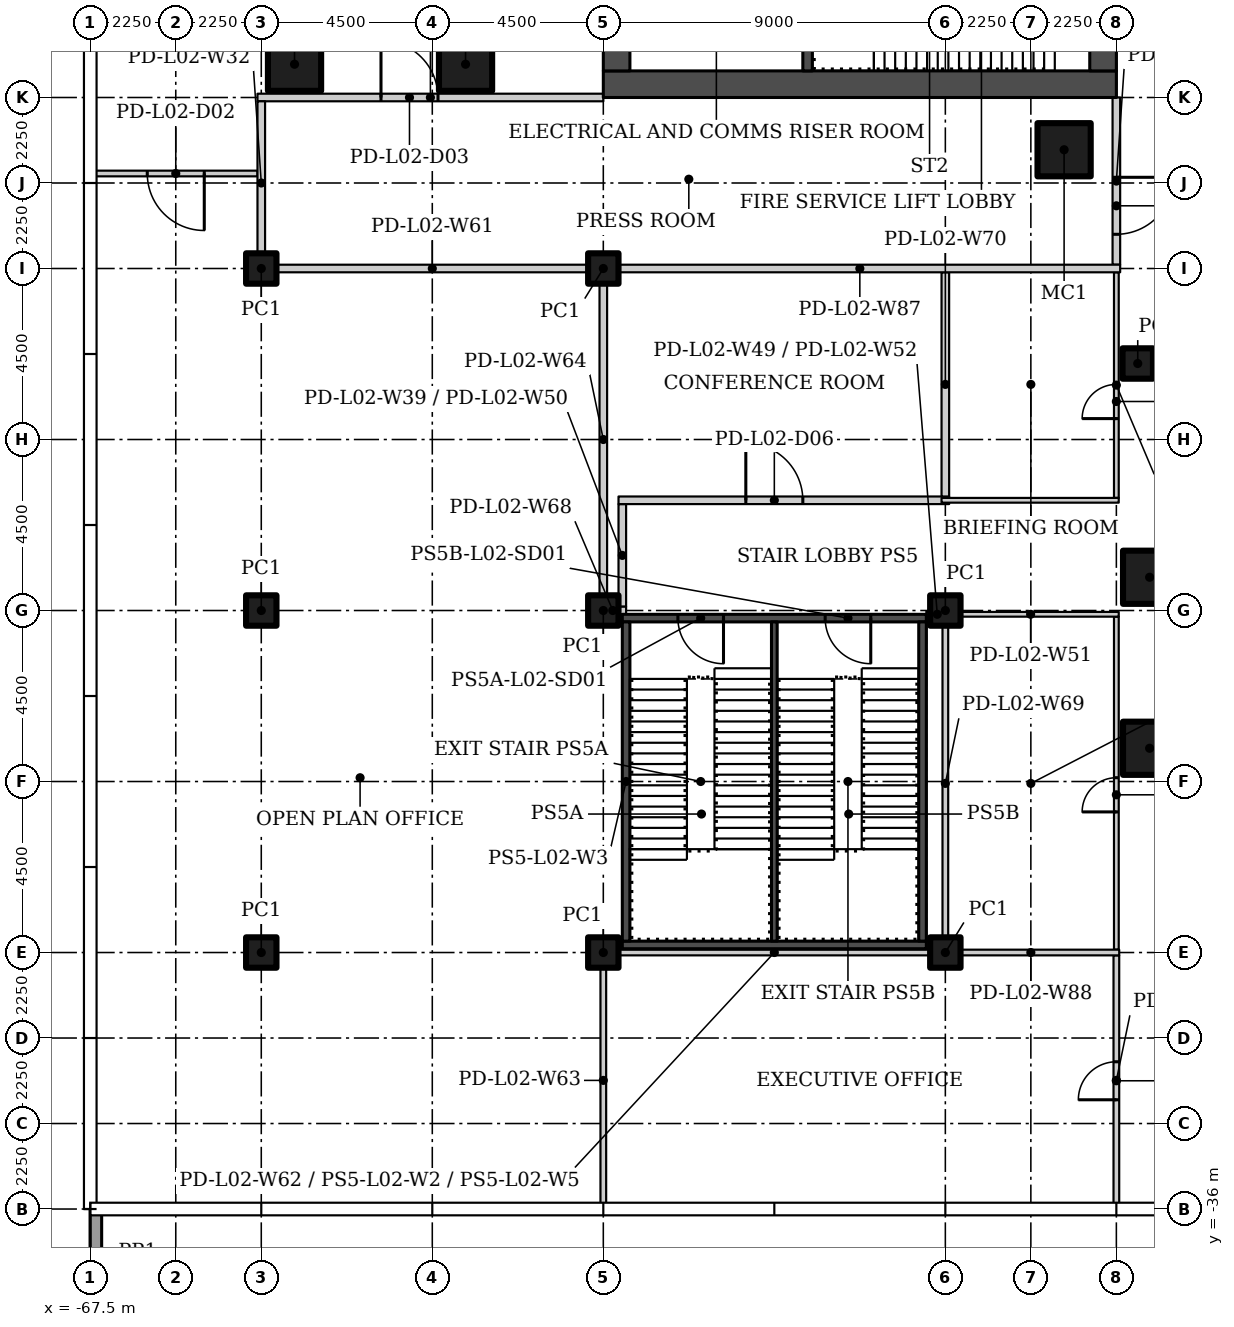
"""IFC4 building model, lengths in metres.
Left out: names, types, materials, properties, quantities, classifications, styles, units other than length and angle.
Written with IfcOpenShell. Run it as: python <this file> out.ifc"""

import sys

from ifc_helpers import new_model, si_unit, direction, frame, frame_2d, origin, origin_2d, place, context, subcontext, project, spatial, rectangle, hollow_rectangle, extrude, element, fill, save


model = new_model("IFC4")
c1 = context("Model", 3, precision=1e-05, world=origin(), true_north=direction((0.0, 1.0)))
c2 = subcontext(c1, "Body", "Model", "MODEL_VIEW")
j1 = project(units=[si_unit("LENGTHUNIT", "METRE"), si_unit("PLANEANGLEUNIT", "RADIAN")], contexts=[c1])
p1 = place(None, origin())
s1 = spatial("IfcSite", under=j1, at=p1, CompositionType="ELEMENT")
p2 = place(p1, origin())
s2 = spatial("IfcBuilding", under=s1, at=p2, CompositionType="ELEMENT")
p3 = place(p2, frame((0.0, 0.0, 12.5)))
s3 = spatial("IfcBuildingStorey", under=s2, at=p3, CompositionType="ELEMENT", Elevation=12.5)
for number, where in (
    (1, (-41.875, -8.125, 0.0)),
    (2, (-57.625, -5.875, 0.0)),
    (3, (-62.125, -5.875, 0.0)),
):
    element("IfcColumn", number, at=place(p3, frame(where)), inside=s3, PredefinedType="COLUMN", context=c2, shape_type="SweptSolid", body=[
        extrude(hollow_rectangle(XDim=1.4, YDim=1.4, WallThickness=0.06, at=origin_2d()), origin(), (0.0, 0.0, 1.0), 5.6),
    ])
p4 = place(p3, frame((-39.938, -13.75, 0.0)))
e4 = element("IfcColumn", 4, at=p4, inside=s3, PredefinedType="COLUMN", context=c2, shape_type="SweptSolid", body=[
    extrude(hollow_rectangle(XDim=0.8, YDim=0.8, WallThickness=0.03, at=origin_2d()), origin(), (0.0, 0.0, 1.0), 5.6),
])
for number, where in (
    (5, (-39.625, -19.375, 0.0)),
    (6, (-39.625, -23.875, 0.0)),
):
    element("IfcColumn", number, at=place(p3, frame(where)), inside=s3, PredefinedType="COLUMN", context=c2, shape_type="SweptSolid", body=[
        extrude(hollow_rectangle(XDim=1.4, YDim=1.4, WallThickness=0.06, at=origin_2d()), origin(), (0.0, 0.0, 1.0), 5.6),
    ])
for number, where in (
    (7, (-63.0, -29.25, 0.0)),
    (8, (-63.0, -20.25, 0.0)),
    (9, (-63.0, -11.25, 0.0)),
    (10, (-54.0, -29.25, 0.0)),
    (11, (-54.0, -20.25, 0.0)),
    (12, (-54.0, -11.25, 0.0)),
    (13, (-45.0, -29.25, 0.0)),
    (14, (-45.0, -20.25, 0.0)),
):
    element("IfcColumn", number, at=place(p3, frame(where)), inside=s3, PredefinedType="COLUMN", context=c2, shape_type="SweptSolid", body=[
        extrude(hollow_rectangle(XDim=0.8, YDim=0.8, WallThickness=0.03, at=origin_2d()), origin(), (0.0, 0.0, 1.0), 5.6),
    ])
p5 = place(p3, frame((-40.5, -6.75, 0.0), z_axis=(0.0, 0.0, 1.0), x_axis=(0.0, -1.0, 0.0)))
e15 = element("IfcWall", 15, at=p5, inside=s3, PredefinedType="PARTITIONING", context=c2, shape_type="SweptSolid", body=[
    extrude(rectangle(XDim=4.4, YDim=0.2, at=frame_2d((2.2, 0.0))), origin(), (0.0, 0.0, 1.0), 5.6),
])
p6 = place(p5, frame((2.1, 0.0, 0.0)))
e16 = element("IfcOpeningElement", 16, at=p6, cuts=e15, PredefinedType="OPENING", context=c2, shape_type="SweptSolid", body=[
    extrude(rectangle(XDim=1.5, YDim=2.1, at=frame_2d((0.75, 1.05))), frame((0.0, 0.11, 0.0), z_axis=(0.0, -1.0, 0.0), x_axis=(1.0, 0.0, 0.0)), (0.0, 0.0, 1.0), 0.22),
])
p7 = place(p3, frame((-40.5, -35.905, 0.0), z_axis=(0.0, 0.0, 1.0), x_axis=(0.0, 1.0, 0.0)))
e17 = element("IfcWall", 17, at=p7, inside=s3, PredefinedType="PARTITIONING", context=c2, shape_type="SweptSolid", body=[
    extrude(rectangle(XDim=6.58, YDim=0.15, at=frame_2d((3.29, 0.0))), origin(), (0.0, 0.0, 1.0), 5.6),
])
p8 = place(p7, frame((2.78, 0.0, 0.0)))
e18 = element("IfcOpeningElement", 18, at=p8, cuts=e17, PredefinedType="OPENING", context=c2, shape_type="SweptSolid", body=[
    extrude(rectangle(XDim=1.0, YDim=2.4, at=frame_2d((0.5, 1.2))), frame((0.0, 0.085, 0.0), z_axis=(0.0, -1.0, 0.0), x_axis=(1.0, 0.0, 0.0)), (0.0, 0.0, 1.0), 0.17),
])
p9 = place(p3, frame((-40.5, -29.175, 0.0), z_axis=(0.0, 0.0, 1.0), x_axis=(0.0, 1.0, 0.0)))
e19 = element("IfcWall", 19, at=p9, inside=s3, PredefinedType="PARTITIONING", context=c2, shape_type="SweptSolid", body=[
    extrude(rectangle(XDim=8.763, YDim=0.125, at=frame_2d((4.381, 0.0))), origin(), (0.0, 0.0, 1.0), 5.6),
])
p10 = place(p9, frame((3.625, 0.0, 0.0)))
e20 = element("IfcOpeningElement", 20, at=p10, cuts=e19, PredefinedType="OPENING", context=c2, shape_type="SweptSolid", body=[
    extrude(rectangle(XDim=0.9, YDim=2.1, at=frame_2d((0.45, 1.05))), frame((0.0, 0.073, 0.0), z_axis=(0.0, -1.0, 0.0), x_axis=(1.0, 0.0, 0.0)), (0.0, 0.0, 1.0), 0.145),
])
p11 = place(p3, frame((-40.5, -17.287, 0.0), z_axis=(0.0, 0.0, 1.0), x_axis=(0.0, 1.0, 0.0)))
e21 = element("IfcWall", 21, at=p11, inside=s3, PredefinedType="PARTITIONING", context=c2, shape_type="SweptSolid", body=[
    extrude(rectangle(XDim=5.937, YDim=0.125, at=frame_2d((2.969, 0.0))), origin(), (0.0, 0.0, 1.0), 5.6),
])
p12 = place(p11, frame((2.087, 0.0, 0.0)))
e22 = element("IfcOpeningElement", 22, at=p12, cuts=e21, PredefinedType="OPENING", context=c2, shape_type="SweptSolid", body=[
    extrude(rectangle(XDim=0.9, YDim=2.1, at=frame_2d((0.45, 1.05))), frame((0.0, 0.073, 0.0), z_axis=(0.0, -1.0, 0.0), x_axis=(1.0, 0.0, 0.0)), (0.0, 0.0, 1.0), 0.145),
])
p13 = place(p3, frame((-63.1, -8.75, 0.0), z_axis=(0.0, 0.0, 1.0), x_axis=(-1.0, 0.0, 0.0)))
e23 = element("IfcWall", 23, at=p13, inside=s3, PredefinedType="PARTITIONING", context=c2, shape_type="SweptSolid", body=[
    extrude(rectangle(XDim=4.305, YDim=0.15, at=frame_2d((2.152, 0.0))), origin(), (0.0, 0.0, 1.0), 5.6),
])
p14 = place(p13, frame((1.4, 0.0, 0.0)))
e24 = element("IfcOpeningElement", 24, at=p14, cuts=e23, PredefinedType="OPENING", context=c2, shape_type="SweptSolid", body=[
    extrude(rectangle(XDim=1.5, YDim=2.1, at=frame_2d((0.75, 1.05))), frame((0.0, 0.085, 0.0), z_axis=(0.0, -1.0, 0.0), x_axis=(1.0, 0.0, 0.0)), (0.0, 0.0, 1.0), 0.17),
])
p15 = place(p3, frame((-63.1, -6.75, 0.0)))
e25 = element("IfcWall", 25, at=p15, inside=s3, PredefinedType="PARTITIONING", context=c2, shape_type="SweptSolid", body=[
    extrude(rectangle(XDim=9.1, YDim=0.2, at=frame_2d((4.55, 0.0))), origin(), (0.0, 0.0, 1.0), 5.6),
])
p16 = place(p15, frame((3.25, 0.0, 0.0)))
e26 = element("IfcOpeningElement", 26, at=p16, cuts=e25, PredefinedType="OPENING", context=c2, shape_type="SweptSolid", body=[
    extrude(rectangle(XDim=1.5, YDim=2.1, at=frame_2d((0.75, 1.05))), frame((0.0, 0.11, 0.0), z_axis=(0.0, -1.0, 0.0), x_axis=(1.0, 0.0, 0.0)), (0.0, 0.0, 1.0), 0.22),
])
p17 = place(p3, frame((-63.0, -11.15, 0.0), z_axis=(0.0, 0.0, 1.0), x_axis=(0.0, 1.0, 0.0)))
e27 = element("IfcWall", 27, at=p17, inside=s3, PredefinedType="PARTITIONING", context=c2, shape_type="SweptSolid", body=[
    extrude(rectangle(XDim=4.3, YDim=0.2, at=frame_2d((2.15, 0.0))), origin(), (0.0, 0.0, 1.0), 5.6),
])
p18 = place(p3, frame((-53.5, -20.15, 0.0), z_axis=(0.0, 0.0, 1.0), x_axis=(0.0, 1.0, 0.0)))
e28 = element("IfcWall", 28, at=p18, inside=s3, PredefinedType="PARTITIONING", context=c2, shape_type="SweptSolid", body=[
    extrude(rectangle(XDim=2.7, YDim=0.2, at=frame_2d((1.35, 0.0))), origin(), (0.0, 0.0, 1.0), 5.6),
])
p19 = place(p3, frame((-44.925, -20.35, 0.0), z_axis=(0.0, 0.0, 1.0), x_axis=(-1.0, 0.0, 0.0)))
e29 = element("IfcWall", 29, at=p19, inside=s3, PredefinedType="PARTITIONING", context=c2, shape_type="SweptSolid", body=[
    extrude(rectangle(XDim=0.575, YDim=0.15, at=frame_2d((0.288, 0.0))), origin(), (0.0, 0.0, 1.0), 5.6),
])
p20 = place(p3, frame((-53.6, -17.35, 0.0)))
e30 = element("IfcWall", 30, at=p20, inside=s3, PredefinedType="PARTITIONING", context=c2, shape_type="SweptSolid", body=[
    extrude(rectangle(XDim=8.7, YDim=0.2, at=frame_2d((4.35, 0.0))), origin(), (0.0, 0.0, 1.0), 5.6),
])
p21 = place(p20, frame((3.35, 0.0, 0.0)))
e31 = element("IfcOpeningElement", 31, at=p21, cuts=e30, PredefinedType="OPENING", context=c2, shape_type="SweptSolid", body=[
    extrude(rectangle(XDim=1.5, YDim=2.1, at=frame_2d((0.75, 1.05))), frame((0.0, 0.11, 0.0), z_axis=(0.0, -1.0, 0.0), x_axis=(1.0, 0.0, 0.0)), (0.0, 0.0, 1.0), 0.22),
])
p22 = place(p3, frame((-40.438, -20.35, 0.0), z_axis=(0.0, 0.0, 1.0), x_axis=(-1.0, 0.0, 0.0)))
e32 = element("IfcWall", 32, at=p22, inside=s3, PredefinedType="PARTITIONING", context=c2, shape_type="SweptSolid", body=[
    extrude(rectangle(XDim=4.637, YDim=0.125, at=frame_2d((2.319, 0.0))), origin(), (0.0, 0.0, 1.0), 5.6),
])
p23 = place(p3, frame((-45.1, -17.35, 0.0)))
e33 = element("IfcWall", 33, at=p23, inside=s3, PredefinedType="PARTITIONING", context=c2, shape_type="SweptSolid", body=[
    extrude(rectangle(XDim=4.663, YDim=0.125, at=frame_2d((2.331, 0.0))), origin(), (0.0, 0.0, 1.0), 5.6),
])
p24 = place(p3, frame((-53.9, -11.25, 0.0), z_axis=(0.0, 0.0, 1.0), x_axis=(-1.0, 0.0, 0.0)))
e34 = element("IfcWall", 34, at=p24, inside=s3, PredefinedType="PARTITIONING", context=c2, shape_type="SweptSolid", body=[
    extrude(rectangle(XDim=9.2, YDim=0.2, at=frame_2d((4.6, 0.0))), origin(), (0.0, 0.0, 1.0), 5.6),
])
p25 = place(p3, frame((-54.075, -29.25, 0.0)))
e35 = element("IfcWall", 35, at=p25, inside=s3, PredefinedType="PARTITIONING", context=c2, shape_type="SweptSolid", body=[
    extrude(rectangle(XDim=9.15, YDim=0.15, at=frame_2d((4.575, 0.0))), origin(), (0.0, 0.0, 1.0), 5.6),
])
p26 = place(p3, frame((-54.0, -35.905, 0.0), z_axis=(0.0, 0.0, 1.0), x_axis=(0.0, 1.0, 0.0)))
e36 = element("IfcWall", 36, at=p26, inside=s3, PredefinedType="PARTITIONING", context=c2, shape_type="SweptSolid", body=[
    extrude(rectangle(XDim=6.58, YDim=0.15, at=frame_2d((3.29, 0.0))), origin(), (0.0, 0.0, 1.0), 5.6),
])
p27 = place(p3, frame((-54.0, -20.15, 0.0), z_axis=(0.0, 0.0, 1.0), x_axis=(0.0, 1.0, 0.0)))
e37 = element("IfcWall", 37, at=p27, inside=s3, PredefinedType="PARTITIONING", context=c2, shape_type="SweptSolid", body=[
    extrude(rectangle(XDim=8.8, YDim=0.2, at=frame_2d((4.4, 0.0))), origin(), (0.0, 0.0, 1.0), 5.6),
])
p28 = place(p3, frame((-53.4, -20.25, 0.0), z_axis=(0.0, 0.0, 1.0), x_axis=(-1.0, 0.0, 0.0)))
e38 = element("IfcWall", 38, at=p28, inside=s3, PredefinedType="PARTITIONING", context=c2, shape_type="SweptSolid", body=[
    extrude(rectangle(XDim=0.7, YDim=0.2, at=frame_2d((0.35, 0.0))), origin(), (0.0, 0.0, 1.0), 5.6),
])
p29 = place(p3, frame((-45.0, -29.175, 0.0), z_axis=(0.0, 0.0, 1.0), x_axis=(0.0, 1.0, 0.0)))
e39 = element("IfcWall", 39, at=p29, inside=s3, PredefinedType="PARTITIONING", context=c2, shape_type="SweptSolid", body=[
    extrude(rectangle(XDim=8.75, YDim=0.15, at=frame_2d((4.375, 0.0))), origin(), (0.0, 0.0, 1.0), 5.6),
])
p30 = place(p3, frame((-45.0, -17.25, 0.0), z_axis=(0.0, 0.0, 1.0), x_axis=(0.0, 1.0, 0.0)))
e40 = element("IfcWall", 40, at=p30, inside=s3, PredefinedType="PARTITIONING", context=c2, shape_type="SweptSolid", body=[
    extrude(rectangle(XDim=5.899, YDim=0.2, at=frame_2d((2.95, 0.0))), origin(), (0.0, 0.0, 1.0), 5.6),
])
p31 = place(p3, frame((-54.1, -11.25, 0.0)))
e41 = element("IfcWall", 41, at=p31, inside=s3, PredefinedType="PARTITIONING", context=c2, shape_type="SweptSolid", body=[
    extrude(rectangle(XDim=13.7, YDim=0.2, at=frame_2d((6.85, 0.0))), origin(), (0.0, 0.0, 1.0), 5.6),
])
p32 = place(p3, frame((-40.425, -29.25, 0.0), z_axis=(0.0, 0.0, 1.0), x_axis=(-1.0, 0.0, 0.0)))
e42 = element("IfcWall", 42, at=p32, inside=s3, PredefinedType="PARTITIONING", context=c2, shape_type="SweptSolid", body=[
    extrude(rectangle(XDim=4.65, YDim=0.15, at=frame_2d((2.325, 0.0))), origin(), (0.0, 0.0, 1.0), 5.6),
])
p33 = place(p3, frame((-67.35, -36.0, 0.0), z_axis=(0.0, 0.0, 1.0), x_axis=(0.0, -1.0, 0.0)))
e43 = element("IfcWall", 43, at=p33, inside=s3, PredefinedType="PARAPET", context=c2, shape_type="SweptSolid", body=[
    extrude(rectangle(XDim=2.25, YDim=0.3, at=frame_2d((1.125, 0.0))), origin(), (0.0, 0.0, 1.0), 1.1),
])
p34 = place(p3, frame((-40.5, -6.4, 0.0), z_axis=(0.0, 0.0, 1.0), x_axis=(-1.0, 0.0, 0.0)))
e44 = element("IfcWall", 44, at=p34, inside=s3, PredefinedType="SHEAR", context=c2, shape_type="SweptSolid", body=[
    extrude(rectangle(XDim=13.5, YDim=0.7, at=frame_2d((6.75, 0.0))), origin(), (0.0, 0.0, 1.0), 5.6),
])
p35 = place(p3, frame((-40.85, -6.05, 0.0), z_axis=(0.0, 0.0, 1.0), x_axis=(0.0, 1.0, 0.0)))
e45 = element("IfcWall", 45, at=p35, inside=s3, PredefinedType="SHEAR", context=c2, shape_type="SweptSolid", body=[
    extrude(rectangle(XDim=12.1, YDim=0.7, at=frame_2d((6.05, 0.0))), origin(), (0.0, 0.0, 1.0), 5.6),
])
p36 = place(p35, frame((6.4, 0.0, 0.0)))
e46 = element("IfcOpeningElement", 46, at=p36, cuts=e45, PredefinedType="OPENING", context=c2, shape_type="SweptSolid", body=[
    extrude(rectangle(XDim=1.8, YDim=2.4, at=frame_2d((0.9, 1.2))), frame((0.0, 0.36, 0.0), z_axis=(0.0, -1.0, 0.0), x_axis=(1.0, 0.0, 0.0)), (0.0, 0.0, 1.0), 0.72),
])
p37 = place(p3, frame((-53.65, -6.05, 0.0), z_axis=(0.0, 0.0, 1.0), x_axis=(0.0, 1.0, 0.0)))
e47 = element("IfcWall", 47, at=p37, inside=s3, PredefinedType="SHEAR", context=c2, shape_type="SweptSolid", body=[
    extrude(rectangle(XDim=12.1, YDim=0.7, at=frame_2d((6.05, 0.0))), origin(), (0.0, 0.0, 1.0), 5.6),
])
p38 = place(p37, frame((0.8, 0.0, 0.0)))
e48 = element("IfcOpeningElement", 48, at=p38, cuts=e47, PredefinedType="OPENING", context=c2, shape_type="SweptSolid", body=[
    extrude(rectangle(XDim=1.2, YDim=2.1, at=frame_2d((0.6, 1.05))), frame((0.0, 0.36, 0.0), z_axis=(0.0, -1.0, 0.0), x_axis=(1.0, 0.0, 0.0)), (0.0, 0.0, 1.0), 0.72),
])
p39 = place(p37, frame((6.4, 0.0, 0.0)))
e49 = element("IfcOpeningElement", 49, at=p39, cuts=e47, PredefinedType="OPENING", context=c2, shape_type="SweptSolid", body=[
    extrude(rectangle(XDim=1.8, YDim=2.4, at=frame_2d((0.9, 1.2))), frame((0.0, 0.36, 0.0), z_axis=(0.0, -1.0, 0.0), x_axis=(1.0, 0.0, 0.0)), (0.0, 0.0, 1.0), 0.72),
])
p40 = place(p3, frame((-48.625, -6.05, 0.0), z_axis=(0.0, 0.0, 1.0), x_axis=(0.0, 1.0, 0.0)))
e50 = element("IfcWall", 50, at=p40, inside=s3, PredefinedType="SHEAR", context=c2, shape_type="SweptSolid", body=[
    extrude(rectangle(XDim=2.55, YDim=0.25, at=frame_2d((1.275, 0.0))), origin(), (0.0, 0.0, 1.0), 5.6),
])
p41 = place(p3, frame((-45.5, -20.45, 0.0), z_axis=(0.0, 0.0, 1.0), x_axis=(-1.0, 0.0, 0.0)))
e51 = element("IfcWall", 51, at=p41, inside=s3, PredefinedType="SHEAR", context=c2, shape_type="SweptSolid", body=[
    extrude(rectangle(XDim=8.0, YDim=0.2, at=frame_2d((4.0, 0.0))), origin(), (0.0, 0.0, 1.0), 5.6),
])
p42 = place(p41, frame((5.337, 0.0, 0.0)))
e52 = element("IfcOpeningElement", 52, at=p42, cuts=e51, PredefinedType="OPENING", context=c2, shape_type="SweptSolid", body=[
    extrude(rectangle(XDim=1.2, YDim=2.4, at=frame_2d((0.6, 1.2))), frame((0.0, 0.11, 0.0), z_axis=(0.0, -1.0, 0.0), x_axis=(1.0, 0.0, 0.0)), (0.0, 0.0, 1.0), 0.22),
])
p43 = place(p41, frame((1.462, 0.0, 0.0)))
e53 = element("IfcOpeningElement", 53, at=p43, cuts=e51, PredefinedType="OPENING", context=c2, shape_type="SweptSolid", body=[
    extrude(rectangle(XDim=1.2, YDim=2.4, at=frame_2d((0.6, 1.2))), frame((0.0, 0.11, 0.0), z_axis=(0.0, -1.0, 0.0), x_axis=(1.0, 0.0, 0.0)), (0.0, 0.0, 1.0), 0.22),
])
p44 = place(p3, frame((-53.5, -29.05, 0.0)))
e54 = element("IfcWall", 54, at=p44, inside=s3, PredefinedType="SHEAR", context=c2, shape_type="SweptSolid", body=[
    extrude(rectangle(XDim=8.0, YDim=0.2, at=frame_2d((4.0, 0.0))), origin(), (0.0, 0.0, 1.0), 5.6),
])
for number, where, z_axis, x_axis in (
    (55, (-53.4, -28.95, 0.0), (0.0, 0.0, 1.0), (0.0, 1.0, 0.0)),
    (56, (-45.6, -28.95, 0.0), (0.0, 0.0, 1.0), (0.0, 1.0, 0.0)),
):
    element("IfcWall", number, at=place(p3, frame(where, z_axis=z_axis, x_axis=x_axis)), inside=s3, PredefinedType="SHEAR", context=c2, shape_type="SweptSolid", body=[
        extrude(rectangle(XDim=8.4, YDim=0.2, at=frame_2d((4.2, 0.0))), origin(), (0.0, 0.0, 1.0), 5.6),
    ])
p45 = place(p3, frame((-49.5, -28.95, 0.0), z_axis=(0.0, 0.0, 1.0), x_axis=(0.0, 1.0, 0.0)))
e57 = element("IfcWall", 57, at=p45, inside=s3, PredefinedType="SHEAR", context=c2, shape_type="SweptSolid", body=[
    extrude(rectangle(XDim=8.4, YDim=0.15, at=frame_2d((4.2, 0.0))), origin(), (0.0, 0.0, 1.0), 5.6),
])
p46 = place(p14, origin())
e58 = element("IfcDoor", 58, at=p46, inside=s3, OperationType="DOUBLE_DOOR_SINGLE_SWING", PredefinedType="DOOR", context=c2, shape_type="SweptSolid", body=[
    extrude(rectangle(XDim=1.5, YDim=2.1, at=frame_2d((0.75, 1.05))), frame((0.0, 0.025, 0.0), z_axis=(0.0, -1.0, 0.0), x_axis=(1.0, 0.0, 0.0)), (0.0, 0.0, 1.0), 0.05),
])
fill(e24, e58)
p47 = place(p16, origin())
e59 = element("IfcDoor", 59, at=p47, inside=s3, OperationType="DOUBLE_DOOR_SINGLE_SWING", PredefinedType="DOOR", context=c2, shape_type="SweptSolid", body=[
    extrude(rectangle(XDim=1.5, YDim=2.1, at=frame_2d((0.75, 1.05))), frame((0.0, 0.025, 0.0), z_axis=(0.0, -1.0, 0.0), x_axis=(1.0, 0.0, 0.0)), (0.0, 0.0, 1.0), 0.05),
])
fill(e26, e59)
p48 = place(p21, origin())
e60 = element("IfcDoor", 60, at=p48, inside=s3, OperationType="DOUBLE_DOOR_SINGLE_SWING", PredefinedType="DOOR", context=c2, shape_type="SweptSolid", body=[
    extrude(rectangle(XDim=1.5, YDim=2.1, at=frame_2d((0.75, 1.05))), frame((0.0, 0.025, 0.0), z_axis=(0.0, -1.0, 0.0), x_axis=(1.0, 0.0, 0.0)), (0.0, 0.0, 1.0), 0.05),
])
fill(e31, e60)
p49 = place(p8, origin())
e61 = element("IfcDoor", 61, at=p49, inside=s3, OperationType="SINGLE_SWING_RIGHT", PredefinedType="DOOR", context=c2, shape_type="SweptSolid", body=[
    extrude(rectangle(XDim=1.0, YDim=2.4, at=frame_2d((0.5, 1.2))), frame((0.0, 0.025, 0.0), z_axis=(0.0, -1.0, 0.0), x_axis=(1.0, 0.0, 0.0)), (0.0, 0.0, 1.0), 0.05),
])
fill(e18, e61)
p50 = place(p10, origin())
e62 = element("IfcDoor", 62, at=p50, inside=s3, OperationType="SINGLE_SWING_LEFT", PredefinedType="DOOR", context=c2, shape_type="SweptSolid", body=[
    extrude(rectangle(XDim=0.9, YDim=2.1, at=frame_2d((0.45, 1.05))), frame((0.0, 0.025, 0.0), z_axis=(0.0, -1.0, 0.0), x_axis=(1.0, 0.0, 0.0)), (0.0, 0.0, 1.0), 0.05),
])
fill(e20, e62)
p51 = place(p12, origin())
e63 = element("IfcDoor", 63, at=p51, inside=s3, OperationType="SINGLE_SWING_LEFT", PredefinedType="DOOR", context=c2, shape_type="SweptSolid", body=[
    extrude(rectangle(XDim=0.9, YDim=2.1, at=frame_2d((0.45, 1.05))), frame((0.0, 0.025, 0.0), z_axis=(0.0, -1.0, 0.0), x_axis=(1.0, 0.0, 0.0)), (0.0, 0.0, 1.0), 0.05),
])
fill(e22, e63)
p52 = place(p6, origin())
e64 = element("IfcDoor", 64, at=p52, inside=s3, OperationType="DOUBLE_DOOR_SINGLE_SWING", PredefinedType="DOOR", context=c2, shape_type="SweptSolid", body=[
    extrude(rectangle(XDim=1.5, YDim=2.1, at=frame_2d((0.75, 1.05))), frame((0.0, 0.025, 0.0), z_axis=(0.0, -1.0, 0.0), x_axis=(1.0, 0.0, 0.0)), (0.0, 0.0, 1.0), 0.05),
])
fill(e16, e64)
p53 = place(p42, origin())
e65 = element("IfcDoor", 65, at=p53, inside=s3, OperationType="SINGLE_SWING_LEFT", PredefinedType="DOOR", context=c2, shape_type="SweptSolid", body=[
    extrude(rectangle(XDim=1.2, YDim=2.4, at=frame_2d((0.6, 1.2))), frame((0.0, 0.025, 0.0), z_axis=(0.0, -1.0, 0.0), x_axis=(1.0, 0.0, 0.0)), (0.0, 0.0, 1.0), 0.05),
])
fill(e52, e65)
p54 = place(p43, origin())
e66 = element("IfcDoor", 66, at=p54, inside=s3, OperationType="SINGLE_SWING_RIGHT", PredefinedType="DOOR", context=c2, shape_type="SweptSolid", body=[
    extrude(rectangle(XDim=1.2, YDim=2.4, at=frame_2d((0.6, 1.2))), frame((0.0, 0.025, 0.0), z_axis=(0.0, -1.0, 0.0), x_axis=(1.0, 0.0, 0.0)), (0.0, 0.0, 1.0), 0.05),
])
fill(e53, e66)
save(model, sys.argv[1])
